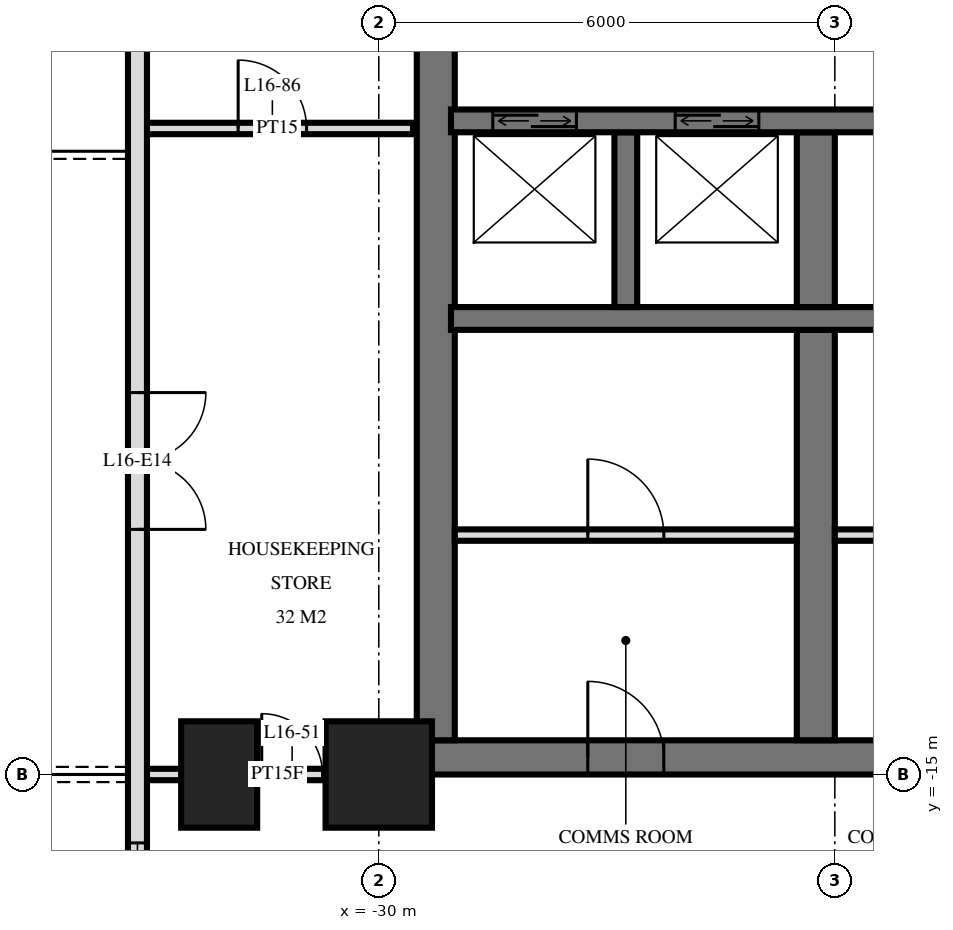
"""IFC4 building model, lengths in metres.
Left out: names, types, materials, properties, quantities, classifications, styles, units other than length and angle.
Written with IfcOpenShell. Run it as: python <this file> out.ifc"""

import sys

from ifc_helpers import new_model, si_unit, direction, frame, frame_2d, origin, origin_2d, place, context, subcontext, project, spatial, rectangle, extrude, element, fill, save


model = new_model("IFC4")
c1 = context("Model", 3, precision=1e-05, world=origin(), true_north=direction((0.0, 1.0)))
c2 = subcontext(c1, "Body", "Model", "MODEL_VIEW")
j1 = project(units=[si_unit("LENGTHUNIT", "METRE"), si_unit("PLANEANGLEUNIT", "RADIAN")], contexts=[c1])
p1 = place(None, origin())
s1 = spatial("IfcSite", under=j1, at=p1, CompositionType="ELEMENT")
p2 = place(p1, origin())
s2 = spatial("IfcBuilding", under=s1, at=p2, CompositionType="ELEMENT")
p3 = place(p2, frame((0.0, 0.0, 67.2)))
s3 = spatial("IfcBuildingStorey", under=s2, at=p3, CompositionType="ELEMENT", Elevation=67.2)
p4 = place(p3, frame((-32.1, -15.0, 0.0), z_axis=(0.0, 0.0, 1.0), x_axis=(0.0, 1.0, 0.0)))
e1 = element("IfcColumn", 1, at=p4, inside=s3, PredefinedType="COLUMN", context=c2, shape_type="SweptSolid", body=[
    extrude(rectangle(XDim=1.4, YDim=1.0, at=origin_2d()), origin(), (0.0, 0.0, 1.0), 3.6),
])
p5 = place(p3, frame((-30.0, -15.0, 0.0), z_axis=(0.0, 0.0, 1.0), x_axis=(1.0, 0.0, 0.0)))
e2 = element("IfcColumn", 2, at=p5, inside=s3, PredefinedType="COLUMN", context=c2, shape_type="SweptSolid", body=[
    extrude(rectangle(XDim=1.4, YDim=1.4, at=origin_2d()), origin(), (0.0, 0.0, 1.0), 3.6),
])
p6 = place(p3, frame((-29.5, -14.775, 0.0), z_axis=(0.0, 0.0, 1.0), x_axis=(1.0, 0.0, 0.0)))
e3 = element("IfcWall", 3, at=p6, inside=s3, PredefinedType="SHEAR", context=c2, shape_type="SweptSolid", body=[
    extrude(rectangle(XDim=19.5, YDim=0.45, at=frame_2d((9.75, 0.0))), origin(), (0.0, 0.0, 1.0), 3.6),
])
p7 = place(p6, frame((11.2, 0.0, 0.0)))
e4 = element("IfcOpeningElement", 4, at=p7, cuts=e3, PredefinedType="OPENING", context=c2, shape_type="SweptSolid", body=[
    extrude(rectangle(XDim=1.2, YDim=2.1, at=frame_2d((0.6, 1.05))), frame((0.0, 0.235, 0.0), z_axis=(0.0, -1.0, 0.0), x_axis=(1.0, 0.0, 0.0)), (0.0, 0.0, 1.0), 0.47),
])
p8 = place(p6, frame((14.25, 0.0, 0.0)))
e5 = element("IfcOpeningElement", 5, at=p8, cuts=e3, PredefinedType="OPENING", context=c2, shape_type="SweptSolid", body=[
    extrude(rectangle(XDim=1.1, YDim=2.1, at=frame_2d((0.55, 1.05))), frame((0.0, 0.235, 0.0), z_axis=(0.0, -1.0, 0.0), x_axis=(1.0, 0.0, 0.0)), (0.0, 0.0, 1.0), 0.47),
])
p9 = place(p6, frame((8.5, 0.0, 0.0)))
e6 = element("IfcOpeningElement", 6, at=p9, cuts=e3, PredefinedType="OPENING", context=c2, shape_type="SweptSolid", body=[
    extrude(rectangle(XDim=0.9, YDim=2.1, at=frame_2d((0.45, 1.05))), frame((0.0, 0.235, 0.0), z_axis=(0.0, -1.0, 0.0), x_axis=(1.0, 0.0, 0.0)), (0.0, 0.0, 1.0), 0.47),
])
p10 = place(p6, frame((6.05, 0.0, 0.0)))
e7 = element("IfcOpeningElement", 7, at=p10, cuts=e3, PredefinedType="OPENING", context=c2, shape_type="SweptSolid", body=[
    extrude(rectangle(XDim=1.0, YDim=2.1, at=frame_2d((0.5, 1.05))), frame((0.0, 0.235, 0.0), z_axis=(0.0, -1.0, 0.0), x_axis=(1.0, 0.0, 0.0)), (0.0, 0.0, 1.0), 0.47),
])
p11 = place(p6, frame((2.25, 0.0, 0.0)))
e8 = element("IfcOpeningElement", 8, at=p11, cuts=e3, PredefinedType="OPENING", context=c2, shape_type="SweptSolid", body=[
    extrude(rectangle(XDim=1.0, YDim=2.1, at=frame_2d((0.5, 1.05))), frame((0.0, 0.235, 0.0), z_axis=(0.0, -1.0, 0.0), x_axis=(1.0, 0.0, 0.0)), (0.0, 0.0, 1.0), 0.47),
])
p12 = place(p3, frame((-29.25, -14.55, 0.0), z_axis=(0.0, 0.0, 1.0), x_axis=(0.0, 1.0, 0.0)))
e9 = element("IfcWall", 9, at=p12, inside=s3, PredefinedType="SHEAR", context=c2, shape_type="SweptSolid", body=[
    extrude(rectangle(XDim=14.1, YDim=0.5, at=frame_2d((7.05, 0.0))), origin(), (0.0, 0.0, 1.0), 3.6),
])
p13 = place(p3, frame((-29.05, -6.4, 0.0), z_axis=(0.0, 0.0, 1.0), x_axis=(1.0, 0.0, 0.0)))
e10 = element("IfcWall", 10, at=p13, inside=s3, PredefinedType="SHEAR", context=c2, shape_type="SweptSolid", body=[
    extrude(rectangle(XDim=18.7, YDim=0.3, at=frame_2d((9.35, 0.0))), origin(), (0.0, 0.0, 1.0), 3.6),
])
p14 = place(p13, frame((2.95, 0.0, 0.0)))
e11 = element("IfcOpeningElement", 11, at=p14, cuts=e10, PredefinedType="OPENING", context=c2, shape_type="SweptSolid", body=[
    extrude(rectangle(XDim=1.1, YDim=2.1, at=frame_2d((0.55, 1.05))), frame((0.0, 0.16, 0.0), z_axis=(0.0, -1.0, 0.0), x_axis=(1.0, 0.0, 0.0)), (0.0, 0.0, 1.0), 0.32),
])
p15 = place(p13, frame((0.55, 0.0, 0.0)))
e12 = element("IfcOpeningElement", 12, at=p15, cuts=e10, PredefinedType="OPENING", context=c2, shape_type="SweptSolid", body=[
    extrude(rectangle(XDim=1.1, YDim=2.1, at=frame_2d((0.55, 1.05))), frame((0.0, 0.16, 0.0), z_axis=(0.0, -1.0, 0.0), x_axis=(1.0, 0.0, 0.0)), (0.0, 0.0, 1.0), 0.32),
])
p16 = place(p13, frame((10.8, 0.0, 0.0)))
e13 = element("IfcOpeningElement", 13, at=p16, cuts=e10, PredefinedType="OPENING", context=c2, shape_type="SweptSolid", body=[
    extrude(rectangle(XDim=1.1, YDim=2.1, at=frame_2d((0.55, 1.05))), frame((0.0, 0.16, 0.0), z_axis=(0.0, -1.0, 0.0), x_axis=(1.0, 0.0, 0.0)), (0.0, 0.0, 1.0), 0.32),
])
p17 = place(p13, frame((5.6, 0.0, 0.0)))
e14 = element("IfcOpeningElement", 14, at=p17, cuts=e10, PredefinedType="OPENING", context=c2, shape_type="SweptSolid", body=[
    extrude(rectangle(XDim=1.0, YDim=2.1, at=frame_2d((0.5, 1.05))), frame((0.0, 0.16, 0.0), z_axis=(0.0, -1.0, 0.0), x_axis=(1.0, 0.0, 0.0)), (0.0, 0.0, 1.0), 0.32),
])
p18 = place(p3, frame((-29.05, -9.0, 0.0), z_axis=(0.0, 0.0, 1.0), x_axis=(1.0, 0.0, 0.0)))
e15 = element("IfcWall", 15, at=p18, inside=s3, PredefinedType="SHEAR", context=c2, shape_type="SweptSolid", body=[
    extrude(rectangle(XDim=18.7, YDim=0.3, at=frame_2d((9.35, 0.0))), origin(), (0.0, 0.0, 1.0), 3.6),
])
p19 = place(p18, frame((13.8, 0.0, 0.0)))
e16 = element("IfcOpeningElement", 16, at=p19, cuts=e15, PredefinedType="OPENING", context=c2, shape_type="SweptSolid", body=[
    extrude(rectangle(XDim=1.1, YDim=2.1, at=frame_2d((0.55, 1.05))), frame((0.0, 0.16, 0.0), z_axis=(0.0, -1.0, 0.0), x_axis=(1.0, 0.0, 0.0)), (0.0, 0.0, 1.0), 0.32),
])
p20 = place(p3, frame((-24.25, -8.85, 0.0), z_axis=(0.0, 0.0, 1.0), x_axis=(0.0, 1.0, 0.0)))
e17 = element("IfcWall", 17, at=p20, inside=s3, PredefinedType="SHEAR", context=c2, shape_type="SweptSolid", body=[
    extrude(rectangle(XDim=2.3, YDim=0.5, at=frame_2d((1.15, 0.0))), origin(), (0.0, 0.0, 1.0), 3.6),
])
p21 = place(p3, frame((-24.25, -14.55, 0.0), z_axis=(0.0, 0.0, 1.0), x_axis=(0.0, 1.0, 0.0)))
e18 = element("IfcWall", 18, at=p21, inside=s3, PredefinedType="SHEAR", context=c2, shape_type="SweptSolid", body=[
    extrude(rectangle(XDim=5.4, YDim=0.5, at=frame_2d((2.7, 0.0))), origin(), (0.0, 0.0, 1.0), 3.6),
])
p22 = place(p3, frame((-26.75, -8.85, 0.0), z_axis=(0.0, 0.0, 1.0), x_axis=(0.0, 1.0, 0.0)))
e19 = element("IfcWall", 19, at=p22, inside=s3, PredefinedType="SHEAR", context=c2, shape_type="SweptSolid", body=[
    extrude(rectangle(XDim=2.3, YDim=0.3, at=frame_2d((1.15, 0.0))), origin(), (0.0, 0.0, 1.0), 3.6),
])
p23 = place(p3, frame((-33.175, -3.325, 0.0), z_axis=(0.0, 0.0, 1.0), x_axis=(0.0, -1.0, 0.0)))
e20 = element("IfcWall", 20, at=p23, inside=s3, PredefinedType="SOLIDWALL", context=c2, shape_type="SweptSolid", body=[
    extrude(rectangle(XDim=21.551, YDim=0.25, at=frame_2d((10.775, 0.0))), origin(), (0.0, 0.0, 1.0), 3.32),
])
p24 = place(p23, frame((6.65, 0.0, 0.0)))
e21 = element("IfcOpeningElement", 21, at=p24, cuts=e20, PredefinedType="OPENING", context=c2, shape_type="SweptSolid", body=[
    extrude(rectangle(XDim=1.8, YDim=2.4, at=frame_2d((0.9, 1.2))), frame((0.0, 0.135, 0.0), z_axis=(0.0, -1.0, 0.0), x_axis=(1.0, 0.0, 0.0)), (0.0, 0.0, 1.0), 0.27),
])
p25 = place(p23, frame((12.575, 0.0, 0.3)))
e22 = element("IfcOpeningElement", 22, at=p25, cuts=e20, PredefinedType="OPENING", context=c2, shape_type="SweptSolid", body=[
    extrude(rectangle(XDim=1.2, YDim=2.1, at=frame_2d((0.6, 1.05))), frame((0.0, 0.135, 0.0), z_axis=(0.0, -1.0, 0.0), x_axis=(1.0, 0.0, 0.0)), (0.0, 0.0, 1.0), 0.27),
])
p26 = place(p23, frame((15.275, 0.0, 0.0)))
e23 = element("IfcOpeningElement", 23, at=p26, cuts=e20, PredefinedType="OPENING", context=c2, shape_type="SweptSolid", body=[
    extrude(rectangle(XDim=1.8, YDim=2.4, at=frame_2d((0.9, 1.2))), frame((0.0, 0.135, 0.0), z_axis=(0.0, -1.0, 0.0), x_axis=(1.0, 0.0, 0.0)), (0.0, 0.0, 1.0), 0.27),
])
p27 = place(p23, frame((18.875, 0.0, 0.0)))
e24 = element("IfcOpeningElement", 24, at=p27, cuts=e20, PredefinedType="OPENING", context=c2, shape_type="SweptSolid", body=[
    extrude(rectangle(XDim=1.8, YDim=2.4, at=frame_2d((0.9, 1.2))), frame((0.0, 0.135, 0.0), z_axis=(0.0, -1.0, 0.0), x_axis=(1.0, 0.0, 0.0)), (0.0, 0.0, 1.0), 0.27),
])
p28 = place(p3, frame((-24.0, -11.85, 0.0), z_axis=(0.0, 0.0, 1.0), x_axis=(1.0, 0.0, 0.0)))
e25 = element("IfcWall", 25, at=p28, inside=s3, PredefinedType="PARTITIONING", context=c2, shape_type="SweptSolid", body=[
    extrude(rectangle(XDim=2.1, YDim=0.15, at=frame_2d((1.05, 0.0))), origin(), (0.0, 0.0, 1.0), 3.3),
])
p29 = place(p28, frame((0.55, 0.0, 0.0)))
e26 = element("IfcOpeningElement", 26, at=p29, cuts=e25, PredefinedType="OPENING", context=c2, shape_type="SweptSolid", body=[
    extrude(rectangle(XDim=1.0, YDim=2.1, at=frame_2d((0.5, 1.05))), frame((0.0, 0.085, 0.0), z_axis=(0.0, -1.0, 0.0), x_axis=(1.0, 0.0, 0.0)), (0.0, 0.0, 1.0), 0.17),
])
p30 = place(p3, frame((-29.0, -11.85, 0.0), z_axis=(0.0, 0.0, 1.0), x_axis=(1.0, 0.0, 0.0)))
e27 = element("IfcWall", 27, at=p30, inside=s3, PredefinedType="PARTITIONING", context=c2, shape_type="SweptSolid", body=[
    extrude(rectangle(XDim=4.5, YDim=0.15, at=frame_2d((2.25, 0.0))), origin(), (0.0, 0.0, 1.0), 3.3),
])
p31 = place(p30, frame((1.75, 0.0, 0.0)))
e28 = element("IfcOpeningElement", 28, at=p31, cuts=e27, PredefinedType="OPENING", context=c2, shape_type="SweptSolid", body=[
    extrude(rectangle(XDim=1.0, YDim=2.1, at=frame_2d((0.5, 1.05))), frame((0.0, 0.085, 0.0), z_axis=(0.0, -1.0, 0.0), x_axis=(1.0, 0.0, 0.0)), (0.0, 0.0, 1.0), 0.17),
])
p32 = place(p3, frame((-33.12, -15.0, 0.0), z_axis=(0.0, 0.0, 1.0), x_axis=(1.0, 0.0, 0.0)))
e29 = element("IfcWall", 29, at=p32, inside=s3, PredefinedType="PARTITIONING", context=c2, shape_type="SweptSolid", body=[
    extrude(rectangle(XDim=3.57, YDim=0.15, at=frame_2d((1.785, 0.0))), origin(), (0.0, 0.0, 1.0), 3.32),
])
p33 = place(p32, frame((1.58, 0.0, 0.0)))
e30 = element("IfcOpeningElement", 30, at=p33, cuts=e29, PredefinedType="OPENING", context=c2, shape_type="SweptSolid", body=[
    extrude(rectangle(XDim=0.8, YDim=2.1, at=frame_2d((0.4, 1.05))), frame((0.0, 0.085, 0.0), z_axis=(0.0, -1.0, 0.0), x_axis=(1.0, 0.0, 0.0)), (0.0, 0.0, 1.0), 0.17),
])
p34 = place(p3, frame((-33.12, -6.5, 0.0), z_axis=(0.0, 0.0, 1.0), x_axis=(1.0, 0.0, 0.0)))
e31 = element("IfcWall", 31, at=p34, inside=s3, PredefinedType="PARTITIONING", context=c2, shape_type="SweptSolid", body=[
    extrude(rectangle(XDim=3.57, YDim=0.15, at=frame_2d((1.785, 0.0))), origin(), (0.0, 0.0, 1.0), 3.32),
])
p35 = place(p34, frame((1.27, 0.0, 0.0)))
e32 = element("IfcOpeningElement", 32, at=p35, cuts=e31, PredefinedType="OPENING", context=c2, shape_type="SweptSolid", body=[
    extrude(rectangle(XDim=0.9, YDim=2.1, at=frame_2d((0.45, 1.05))), frame((0.0, 0.085, 0.0), z_axis=(0.0, -1.0, 0.0), x_axis=(1.0, 0.0, 0.0)), (0.0, 0.0, 1.0), 0.17),
])
p36 = place(p24, origin())
e33 = element("IfcDoor", 33, at=p36, inside=s3, OperationType="DOUBLE_DOOR_SINGLE_SWING", PredefinedType="DOOR", context=c2, shape_type="SweptSolid", body=[
    extrude(rectangle(XDim=1.8, YDim=2.4, at=frame_2d((0.9, 1.2))), frame((0.0, 0.025, 0.0), z_axis=(0.0, -1.0, 0.0), x_axis=(1.0, 0.0, 0.0)), (0.0, 0.0, 1.0), 0.05),
])
fill(e21, e33)
p37 = place(p25, origin())
e34 = element("IfcWindow", 34, at=p37, inside=s3, PartitioningType="SINGLE_PANEL", PredefinedType="WINDOW", context=c2, shape_type="SweptSolid", body=[
    extrude(rectangle(XDim=1.2, YDim=2.1, at=frame_2d((0.6, 1.05))), frame((0.0, 0.03, 0.0), z_axis=(0.0, -1.0, 0.0), x_axis=(1.0, 0.0, 0.0)), (0.0, 0.0, 1.0), 0.06),
])
fill(e22, e34)
p38 = place(p14, origin())
e35 = element("IfcDoor", 35, at=p38, inside=s3, OperationType="DOUBLE_DOOR_SLIDING", PredefinedType="USERDEFINED", context=c2, shape_type="SweptSolid", body=[
    extrude(rectangle(XDim=1.1, YDim=2.1, at=frame_2d((0.55, 1.05))), frame((0.0, 0.025, 0.0), z_axis=(0.0, -1.0, 0.0), x_axis=(1.0, 0.0, 0.0)), (0.0, 0.0, 1.0), 0.05),
])
fill(e11, e35)
p39 = place(p15, origin())
e36 = element("IfcDoor", 36, at=p39, inside=s3, OperationType="DOUBLE_DOOR_SLIDING", PredefinedType="USERDEFINED", context=c2, shape_type="SweptSolid", body=[
    extrude(rectangle(XDim=1.1, YDim=2.1, at=frame_2d((0.55, 1.05))), frame((0.0, 0.025, 0.0), z_axis=(0.0, -1.0, 0.0), x_axis=(1.0, 0.0, 0.0)), (0.0, 0.0, 1.0), 0.05),
])
fill(e12, e36)
p40 = place(p11, origin())
e37 = element("IfcDoor", 37, at=p40, inside=s3, OperationType="SINGLE_SWING_RIGHT", PredefinedType="DOOR", context=c2, shape_type="SweptSolid", body=[
    extrude(rectangle(XDim=1.0, YDim=2.1, at=frame_2d((0.5, 1.05))), frame((0.0, 0.025, 0.0), z_axis=(0.0, -1.0, 0.0), x_axis=(1.0, 0.0, 0.0)), (0.0, 0.0, 1.0), 0.05),
])
fill(e8, e37)
p41 = place(p31, origin())
e38 = element("IfcDoor", 38, at=p41, inside=s3, OperationType="SINGLE_SWING_RIGHT", PredefinedType="DOOR", context=c2, shape_type="SweptSolid", body=[
    extrude(rectangle(XDim=1.0, YDim=2.1, at=frame_2d((0.5, 1.05))), frame((0.0, 0.025, 0.0), z_axis=(0.0, -1.0, 0.0), x_axis=(1.0, 0.0, 0.0)), (0.0, 0.0, 1.0), 0.05),
])
fill(e28, e38)
p42 = place(p33, origin())
e39 = element("IfcDoor", 39, at=p42, inside=s3, OperationType="SINGLE_SWING_RIGHT", PredefinedType="DOOR", context=c2, shape_type="SweptSolid", body=[
    extrude(rectangle(XDim=0.8, YDim=2.1, at=frame_2d((0.4, 1.05))), frame((0.0, 0.025, 0.0), z_axis=(0.0, -1.0, 0.0), x_axis=(1.0, 0.0, 0.0)), (0.0, 0.0, 1.0), 0.05),
])
fill(e30, e39)
p43 = place(p35, origin())
e40 = element("IfcDoor", 40, at=p43, inside=s3, OperationType="SINGLE_SWING_RIGHT", PredefinedType="DOOR", context=c2, shape_type="SweptSolid", body=[
    extrude(rectangle(XDim=0.9, YDim=2.1, at=frame_2d((0.45, 1.05))), frame((0.0, 0.025, 0.0), z_axis=(0.0, -1.0, 0.0), x_axis=(1.0, 0.0, 0.0)), (0.0, 0.0, 1.0), 0.05),
])
fill(e32, e40)
save(model, sys.argv[1])
